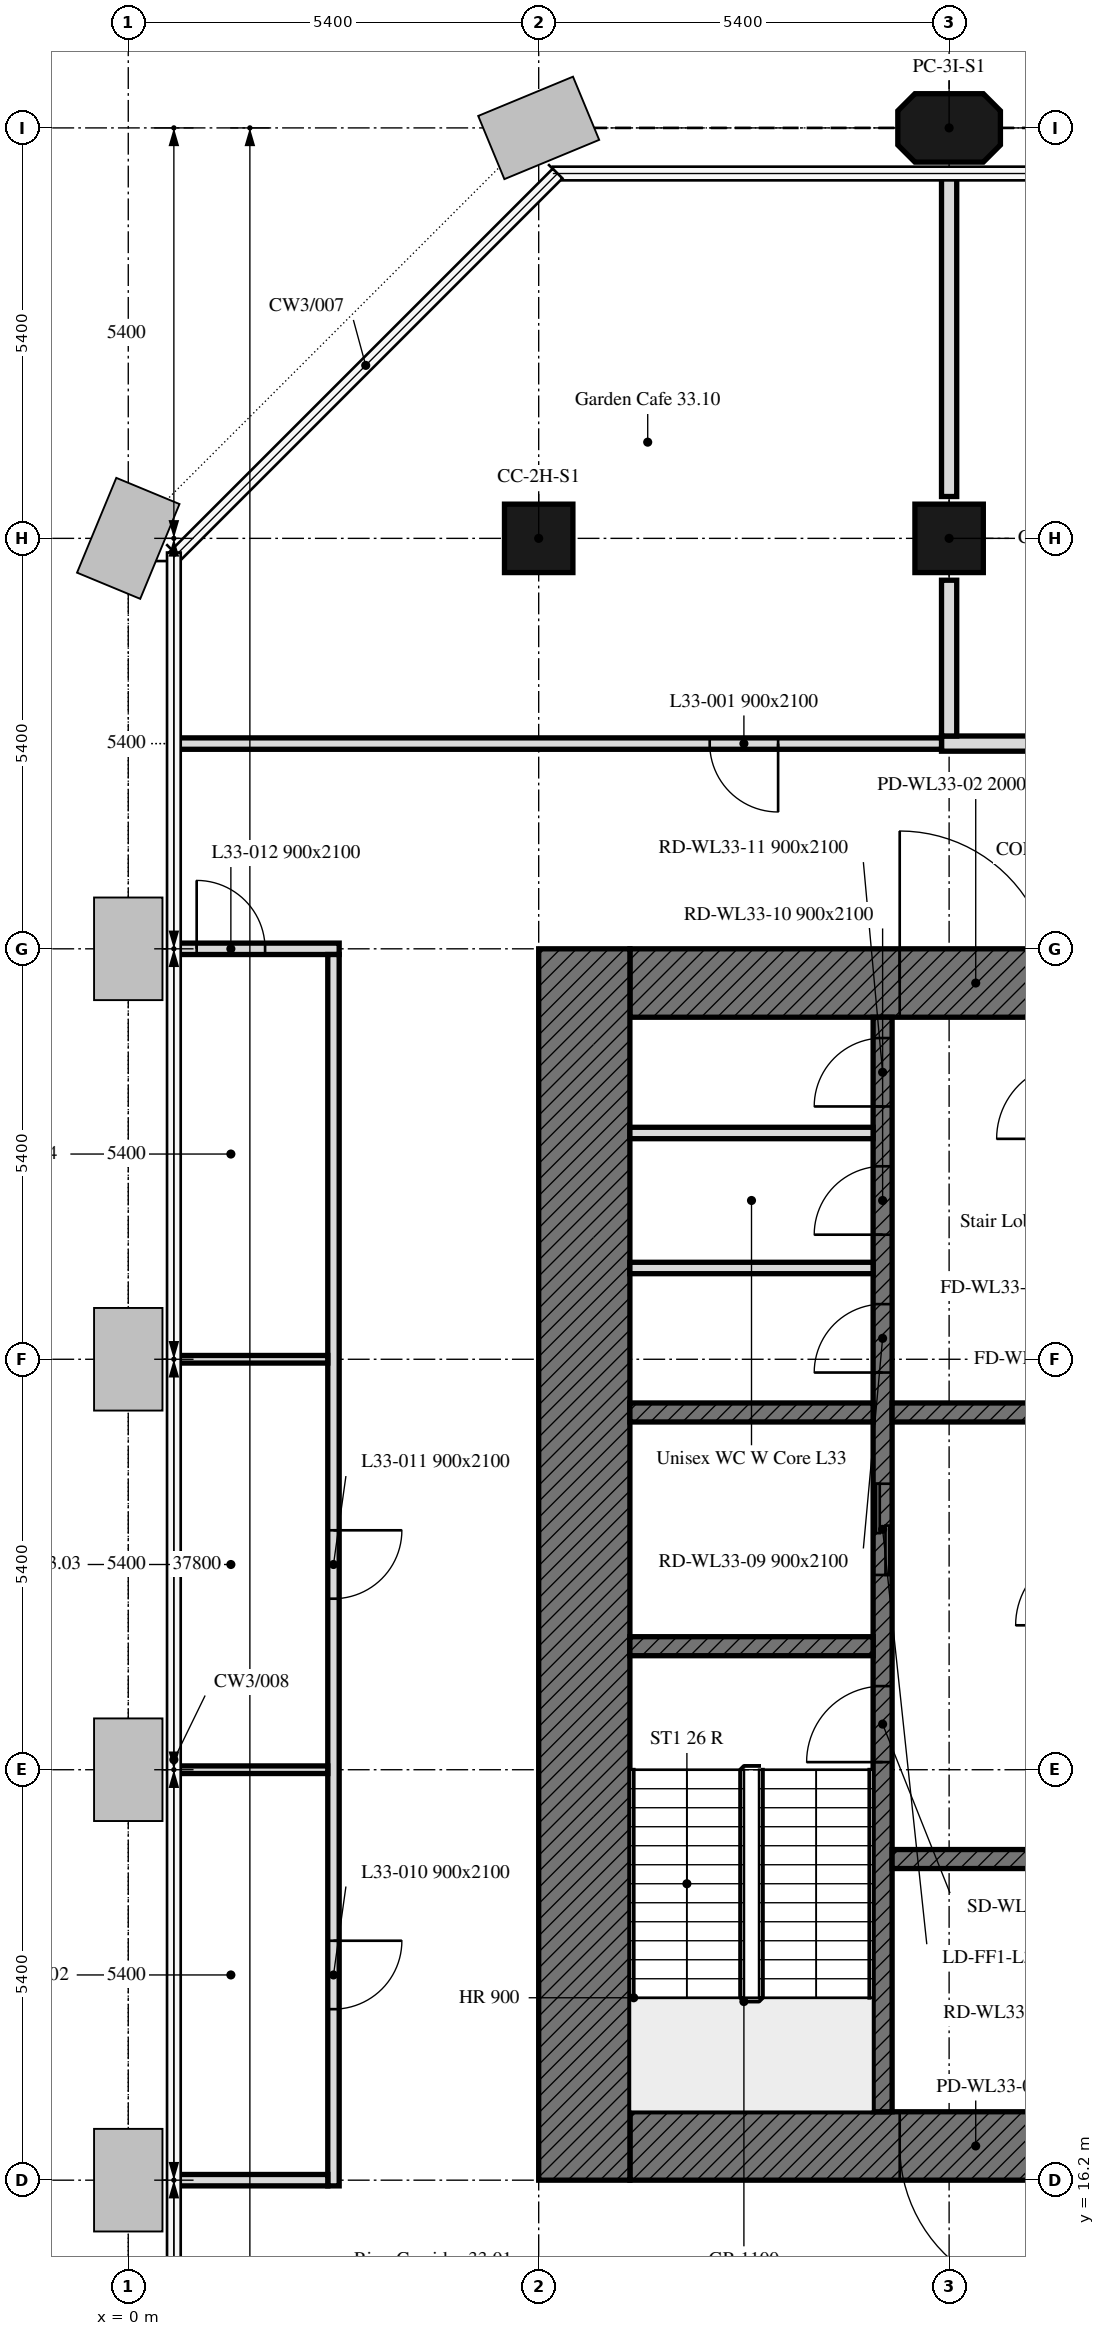
"""IFC4 building model, lengths in metres.
Left out: names, types, materials, properties, quantities, classifications, styles, units other than length and angle.
Written with IfcOpenShell. Run it as: python <this file> out.ifc"""

import sys

from ifc_helpers import new_model, si_unit, direction, frame, frame_2d, origin, origin_2d, place, context, subcontext, project, spatial, polyline, rectangle, outline, extrude, element, fill, save


model = new_model("IFC4")
c1 = context("Model", 3, precision=1e-05, world=origin(), true_north=direction((0.0, 1.0)))
c2 = subcontext(c1, "Body", "Model", "MODEL_VIEW")
j1 = project(units=[si_unit("LENGTHUNIT", "METRE"), si_unit("PLANEANGLEUNIT", "RADIAN")], contexts=[c1])
p1 = place(None, origin())
s1 = spatial("IfcSite", under=j1, at=p1, CompositionType="ELEMENT")
p2 = place(p1, origin())
s2 = spatial("IfcBuilding", under=s1, at=p2, CompositionType="ELEMENT")
p3 = place(p2, frame((0.0, 0.0, 143.2)))
s3 = spatial("IfcBuildingStorey", under=s2, at=p3, CompositionType="ELEMENT", Elevation=143.2)
for number, where, z_axis, x_axis in (
    (1, (5.4, 37.8, 0.0), (0.0, 0.0, 1.0), (1.0, 0.0, 0.0)),
    (2, (10.8, 37.8, 0.0), (0.0, 0.0, 1.0), (1.0, 0.0, 0.0)),
):
    element("IfcColumn", number, at=place(p3, frame(where, z_axis=z_axis, x_axis=x_axis)), inside=s3, PredefinedType="COLUMN", context=c2, shape_type="SweptSolid", body=[
        extrude(rectangle(XDim=0.9, YDim=0.9, at=origin_2d()), origin(), (0.0, 0.0, 1.0), 4.5),
    ])
p4 = place(p3, frame((10.8, 43.2, 0.0), z_axis=(0.0, 0.0, 1.0), x_axis=(1.0, 0.0, 0.0)))
e3 = element("IfcColumn", 3, at=p4, inside=s3, PredefinedType="COLUMN", context=c2, shape_type="SweptSolid", body=[
    extrude(outline(polyline([(-0.45, -0.45), (0.45, -0.45), (0.675, -0.225), (0.675, 0.225), (0.45, 0.45), (-0.45, 0.45), (-0.675, 0.225), (-0.675, -0.225), (-0.45, -0.45)])), origin(), (0.0, 0.0, 1.0), 4.5),
])
p5 = place(p3, frame((17.7, 16.65, 0.0), z_axis=(0.0, 0.0, 1.0), x_axis=(-1.0, 0.0, 0.0)))
e4 = element("IfcWall", 4, at=p5, inside=s3, PredefinedType="SOLIDWALL", context=c2, shape_type="SweptSolid", body=[
    extrude(rectangle(XDim=11.1, YDim=0.9, at=frame_2d((5.55, 0.0))), origin(), (0.0, 0.0, 1.0), 4.5),
])
p6 = place(p5, frame((5.55, 0.0, 0.0)))
e5 = element("IfcOpeningElement", 5, at=p6, cuts=e4, PredefinedType="OPENING", context=c2, shape_type="SweptSolid", body=[
    extrude(rectangle(XDim=2.0, YDim=2.4, at=frame_2d((1.0, 1.2))), frame((0.0, 0.45, 0.0), z_axis=(0.0, -1.0, 0.0), x_axis=(1.0, 0.0, 0.0)), (0.0, 0.0, 1.0), 0.9),
])
p7 = place(p3, frame((6.6, 31.95, 0.0), z_axis=(0.0, 0.0, 1.0), x_axis=(1.0, 0.0, 0.0)))
e6 = element("IfcWall", 6, at=p7, inside=s3, PredefinedType="SOLIDWALL", context=c2, shape_type="SweptSolid", body=[
    extrude(rectangle(XDim=11.1, YDim=0.9, at=frame_2d((5.55, 0.0))), origin(), (0.0, 0.0, 1.0), 4.5),
])
p8 = place(p7, frame((3.55, 0.0, 0.0)))
e7 = element("IfcOpeningElement", 7, at=p8, cuts=e6, PredefinedType="OPENING", context=c2, shape_type="SweptSolid", body=[
    extrude(rectangle(XDim=2.0, YDim=2.4, at=frame_2d((1.0, 1.2))), frame((0.0, 0.45, 0.0), z_axis=(0.0, -1.0, 0.0), x_axis=(1.0, 0.0, 0.0)), (0.0, 0.0, 1.0), 0.9),
])
p9 = place(p3, frame((6.0, 16.2, 0.0), z_axis=(0.0, 0.0, 1.0), x_axis=(0.0, 1.0, 0.0)))
e8 = element("IfcWall", 8, at=p9, inside=s3, PredefinedType="SOLIDWALL", context=c2, shape_type="SweptSolid", body=[
    extrude(rectangle(XDim=16.2, YDim=1.2, at=frame_2d((8.1, 0.0))), origin(), (0.0, 0.0, 1.0), 4.5),
])
p10 = place(p3, frame((9.925, 17.1, 0.0), z_axis=(0.0, 0.0, 1.0), x_axis=(0.0, 1.0, 0.0)))
e9 = element("IfcWall", 9, at=p10, inside=s3, PredefinedType="SOLIDWALL", context=c2, shape_type="SweptSolid", body=[
    extrude(rectangle(XDim=14.4, YDim=0.25, at=frame_2d((7.2, 0.0))), origin(), (0.0, 0.0, 1.0), 4.5),
])
p11 = place(p10, frame((4.6, 0.0, 0.0)))
e10 = element("IfcOpeningElement", 10, at=p11, cuts=e9, PredefinedType="OPENING", context=c2, shape_type="SweptSolid", body=[
    extrude(rectangle(XDim=1.0, YDim=2.1, at=frame_2d((0.5, 1.05))), frame((0.0, 0.125, 0.0), z_axis=(0.0, -1.0, 0.0), x_axis=(1.0, 0.0, 0.0)), (0.0, 0.0, 1.0), 0.25),
])
p12 = place(p10, frame((7.062, 0.0, 0.0)))
e11 = element("IfcOpeningElement", 11, at=p12, cuts=e9, PredefinedType="OPENING", context=c2, shape_type="SweptSolid", body=[
    extrude(rectangle(XDim=1.2, YDim=2.1, at=frame_2d((0.6, 1.05))), frame((0.0, 0.125, 0.0), z_axis=(0.0, -1.0, 0.0), x_axis=(1.0, 0.0, 0.0)), (0.0, 0.0, 1.0), 0.25),
])
p13 = place(p10, frame((9.726, 0.0, 0.0)))
e12 = element("IfcOpeningElement", 12, at=p13, cuts=e9, PredefinedType="OPENING", context=c2, shape_type="SweptSolid", body=[
    extrude(rectangle(XDim=0.9, YDim=2.1, at=frame_2d((0.45, 1.05))), frame((0.0, 0.125, 0.0), z_axis=(0.0, -1.0, 0.0), x_axis=(1.0, 0.0, 0.0)), (0.0, 0.0, 1.0), 0.25),
])
p14 = place(p10, frame((11.539, 0.0, 0.0)))
e13 = element("IfcOpeningElement", 13, at=p14, cuts=e9, PredefinedType="OPENING", context=c2, shape_type="SweptSolid", body=[
    extrude(rectangle(XDim=0.9, YDim=2.1, at=frame_2d((0.45, 1.05))), frame((0.0, 0.125, 0.0), z_axis=(0.0, -1.0, 0.0), x_axis=(1.0, 0.0, 0.0)), (0.0, 0.0, 1.0), 0.25),
])
p15 = place(p10, frame((13.226, 0.0, 0.0)))
e14 = element("IfcOpeningElement", 14, at=p15, cuts=e9, PredefinedType="OPENING", context=c2, shape_type="SweptSolid", body=[
    extrude(rectangle(XDim=0.9, YDim=2.1, at=frame_2d((0.45, 1.05))), frame((0.0, 0.125, 0.0), z_axis=(0.0, -1.0, 0.0), x_axis=(1.0, 0.0, 0.0)), (0.0, 0.0, 1.0), 0.25),
])
for number, where, z_axis, x_axis in (
    (15, (6.6, 23.225, 0.0), (0.0, 0.0, 1.0), (1.0, 0.0, 0.0)),
    (16, (6.6, 26.3, 0.0), (0.0, 0.0, 1.0), (1.0, 0.0, 0.0)),
):
    element("IfcWall", number, at=place(p3, frame(where, z_axis=z_axis, x_axis=x_axis)), inside=s3, PredefinedType="SOLIDWALL", context=c2, shape_type="SweptSolid", body=[
        extrude(rectangle(XDim=3.2, YDim=0.25, at=frame_2d((1.6, 0.0))), origin(), (0.0, 0.0, 1.0), 4.5),
    ])
for number, where, z_axis, x_axis in (
    (17, (10.05, 26.3, 0.0), (0.0, 0.0, 1.0), (1.0, 0.0, 0.0)),
    (18, (10.05, 20.425, 0.0), (0.0, 0.0, 1.0), (1.0, 0.0, 0.0)),
):
    element("IfcWall", number, at=place(p3, frame(where, z_axis=z_axis, x_axis=x_axis)), inside=s3, PredefinedType="SOLIDWALL", context=c2, shape_type="SweptSolid", body=[
        extrude(rectangle(XDim=2.75, YDim=0.25, at=frame_2d((1.375, 0.0))), origin(), (0.0, 0.0, 1.0), 4.5),
    ])
for number, where, z_axis, x_axis in (
    (19, (6.6, 28.201, 0.0), (0.0, 0.0, 1.0), (1.0, 0.0, 0.0)),
    (20, (6.6, 29.977, 0.0), (0.0, 0.0, 1.0), (1.0, 0.0, 0.0)),
):
    element("IfcWall", number, at=place(p3, frame(where, z_axis=z_axis, x_axis=x_axis)), inside=s3, PredefinedType="PARTITIONING", context=c2, shape_type="SweptSolid", body=[
        extrude(rectangle(XDim=3.2, YDim=0.15, at=frame_2d((1.6, 0.0))), origin(), (0.0, 0.0, 1.0), 4.5),
    ])
p16 = place(p3, frame((32.5, 35.1, 0.0), z_axis=(0.0, 0.0, 1.0), x_axis=(-1.0, 0.0, 0.0)))
e21 = element("IfcWall", 21, at=p16, inside=s3, PredefinedType="PARTITIONING", context=c2, shape_type="SweptSolid", body=[
    extrude(rectangle(XDim=21.8, YDim=0.2, at=frame_2d((10.9, 0.0))), origin(), (0.0, 0.0, 1.0), 3.75),
])
p17 = place(p16, frame((13.15, 0.0, 0.0)))
e22 = element("IfcOpeningElement", 22, at=p17, cuts=e21, PredefinedType="OPENING", context=c2, shape_type="SweptSolid", body=[
    extrude(rectangle(XDim=0.9, YDim=2.1, at=frame_2d((0.45, 1.05))), frame((0.0, 0.1, 0.0), z_axis=(0.0, -1.0, 0.0), x_axis=(1.0, 0.0, 0.0)), (0.0, 0.0, 1.0), 0.2),
])
p18 = place(p16, frame((2.35, 0.0, 0.0)))
e23 = element("IfcOpeningElement", 23, at=p18, cuts=e21, PredefinedType="OPENING", context=c2, shape_type="SweptSolid", body=[
    extrude(rectangle(XDim=0.9, YDim=2.1, at=frame_2d((0.45, 1.05))), frame((0.0, 0.1, 0.0), z_axis=(0.0, -1.0, 0.0), x_axis=(1.0, 0.0, 0.0)), (0.0, 0.0, 1.0), 0.2),
])
p19 = place(p3, frame((10.7, 35.1, 0.0), z_axis=(0.0, 0.0, 1.0), x_axis=(-1.0, 0.0, 0.0)))
e24 = element("IfcWall", 24, at=p19, inside=s3, PredefinedType="PARTITIONING", context=c2, shape_type="SweptSolid", body=[
    extrude(rectangle(XDim=10.1, YDim=0.15, at=frame_2d((5.05, 0.0))), origin(), (0.0, 0.0, 1.0), 4.5),
])
p20 = place(p19, frame((2.15, 0.0, 0.0)))
e25 = element("IfcOpeningElement", 25, at=p20, cuts=e24, PredefinedType="OPENING", context=c2, shape_type="SweptSolid", body=[
    extrude(rectangle(XDim=0.9, YDim=2.1, at=frame_2d((0.45, 1.05))), frame((0.0, 0.075, 0.0), z_axis=(0.0, -1.0, 0.0), x_axis=(1.0, 0.0, 0.0)), (0.0, 0.0, 1.0), 0.15),
])
p21 = place(p3, frame((0.6, 32.4, 0.0), z_axis=(0.0, 0.0, 1.0), x_axis=(1.0, 0.0, 0.0)))
e26 = element("IfcWall", 26, at=p21, inside=s3, PredefinedType="PARTITIONING", context=c2, shape_type="SweptSolid", body=[
    extrude(rectangle(XDim=2.175, YDim=0.15, at=frame_2d((1.087, 0.0))), origin(), (0.0, 0.0, 1.0), 3.75),
])
p22 = place(p21, frame((0.3, 0.0, 0.0)))
e27 = element("IfcOpeningElement", 27, at=p22, cuts=e26, PredefinedType="OPENING", context=c2, shape_type="SweptSolid", body=[
    extrude(rectangle(XDim=0.9, YDim=2.1, at=frame_2d((0.45, 1.05))), frame((0.0, 0.075, 0.0), z_axis=(0.0, -1.0, 0.0), x_axis=(1.0, 0.0, 0.0)), (0.0, 0.0, 1.0), 0.15),
])
p23 = place(p3, frame((2.7, 32.325, 0.0), z_axis=(0.0, 0.0, 1.0), x_axis=(0.0, -1.0, 0.0)))
e28 = element("IfcWall", 28, at=p23, inside=s3, PredefinedType="PARTITIONING", context=c2, shape_type="SweptSolid", body=[
    extrude(rectangle(XDim=16.2, YDim=0.15, at=frame_2d((8.1, 0.0))), origin(), (0.0, 0.0, 1.0), 3.75),
])
p24 = place(p23, frame((12.975, 0.0, 0.0)))
e29 = element("IfcOpeningElement", 29, at=p24, cuts=e28, PredefinedType="OPENING", context=c2, shape_type="SweptSolid", body=[
    extrude(rectangle(XDim=0.9, YDim=2.1, at=frame_2d((0.45, 1.05))), frame((0.0, 0.075, 0.0), z_axis=(0.0, -1.0, 0.0), x_axis=(1.0, 0.0, 0.0)), (0.0, 0.0, 1.0), 0.15),
])
p25 = place(p23, frame((7.575, 0.0, 0.0)))
e30 = element("IfcOpeningElement", 30, at=p25, cuts=e28, PredefinedType="OPENING", context=c2, shape_type="SweptSolid", body=[
    extrude(rectangle(XDim=0.9, YDim=2.1, at=frame_2d((0.45, 1.05))), frame((0.0, 0.075, 0.0), z_axis=(0.0, -1.0, 0.0), x_axis=(1.0, 0.0, 0.0)), (0.0, 0.0, 1.0), 0.15),
])
p26 = place(p3, frame((2.625, 16.2, 0.0), z_axis=(0.0, 0.0, 1.0), x_axis=(-1.0, 0.0, 0.0)))
e31 = element("IfcWall", 31, at=p26, inside=s3, PredefinedType="PARTITIONING", context=c2, shape_type="SweptSolid", body=[
    extrude(rectangle(XDim=2.025, YDim=0.15, at=frame_2d((1.012, 0.0))), origin(), (0.0, 0.0, 1.0), 4.5),
])
p27 = place(p3, frame((10.8, 35.2, 0.0), z_axis=(0.0, 0.0, 1.0), x_axis=(0.0, 1.0, 0.0)))
e32 = element("IfcWall", 32, at=p27, inside=s3, PredefinedType="PARTITIONING", context=c2, shape_type="SweptSolid", body=[
    extrude(rectangle(XDim=2.049, YDim=0.2, at=frame_2d((1.025, 0.0))), origin(), (0.0, 0.0, 1.0), 4.5),
])
p28 = place(p3, frame((10.8, 38.351, 0.0), z_axis=(0.0, 0.0, 1.0), x_axis=(0.0, 1.0, 0.0)))
e33 = element("IfcWall", 33, at=p28, inside=s3, PredefinedType="PARTITIONING", context=c2, shape_type="SweptSolid", body=[
    extrude(rectangle(XDim=4.25, YDim=0.2, at=frame_2d((2.125, 0.0))), origin(), (0.0, 0.0, 1.0), 4.5),
])
for number, where, z_axis, x_axis in (
    (34, (2.625, 21.6, 0.0), (0.0, 0.0, 1.0), (-1.0, 0.0, 0.0)),
    (35, (2.625, 27.0, 0.0), (0.0, 0.0, 1.0), (-1.0, 0.0, 0.0)),
):
    element("IfcWall", number, at=place(p3, frame(where, z_axis=z_axis, x_axis=x_axis)), inside=s3, PredefinedType="PARTITIONING", context=c2, shape_type="SweptSolid", body=[
        extrude(rectangle(XDim=2.025, YDim=0.1, at=frame_2d((1.012, 0.0))), origin(), (0.0, 0.0, 1.0), 4.5),
    ])
p29 = place(p6, origin())
e36 = element("IfcDoor", 36, at=p29, inside=s3, OperationType="DOUBLE_DOOR_SINGLE_SWING", PredefinedType="DOOR", context=c2, shape_type="SweptSolid", body=[
    extrude(rectangle(XDim=2.0, YDim=2.4, at=frame_2d((1.0, 1.2))), frame((0.0, 0.025, 0.0), z_axis=(0.0, -1.0, 0.0), x_axis=(1.0, 0.0, 0.0)), (0.0, 0.0, 1.0), 0.05),
])
fill(e5, e36)
p30 = place(p8, origin())
e37 = element("IfcDoor", 37, at=p30, inside=s3, OperationType="DOUBLE_DOOR_SINGLE_SWING", PredefinedType="DOOR", context=c2, shape_type="SweptSolid", body=[
    extrude(rectangle(XDim=2.0, YDim=2.4, at=frame_2d((1.0, 1.2))), frame((0.0, 0.025, 0.0), z_axis=(0.0, -1.0, 0.0), x_axis=(1.0, 0.0, 0.0)), (0.0, 0.0, 1.0), 0.05),
])
fill(e7, e37)
p31 = place(p11, origin())
e38 = element("IfcDoor", 38, at=p31, inside=s3, OperationType="SINGLE_SWING_LEFT", PredefinedType="DOOR", context=c2, shape_type="SweptSolid", body=[
    extrude(rectangle(XDim=1.0, YDim=2.1, at=frame_2d((0.5, 1.05))), frame((0.0, 0.025, 0.0), z_axis=(0.0, -1.0, 0.0), x_axis=(1.0, 0.0, 0.0)), (0.0, 0.0, 1.0), 0.05),
])
fill(e10, e38)
p32 = place(p12, origin())
e39 = element("IfcDoor", 39, at=p32, inside=s3, OperationType="DOUBLE_DOOR_SLIDING", PredefinedType="DOOR", context=c2, shape_type="SweptSolid", body=[
    extrude(rectangle(XDim=1.2, YDim=2.1, at=frame_2d((0.6, 1.05))), frame((0.0, 0.025, 0.0), z_axis=(0.0, -1.0, 0.0), x_axis=(1.0, 0.0, 0.0)), (0.0, 0.0, 1.0), 0.05),
])
fill(e11, e39)
p33 = place(p13, origin())
e40 = element("IfcDoor", 40, at=p33, inside=s3, OperationType="SINGLE_SWING_LEFT", PredefinedType="DOOR", context=c2, shape_type="SweptSolid", body=[
    extrude(rectangle(XDim=0.9, YDim=2.1, at=frame_2d((0.45, 1.05))), frame((0.0, 0.025, 0.0), z_axis=(0.0, -1.0, 0.0), x_axis=(1.0, 0.0, 0.0)), (0.0, 0.0, 1.0), 0.05),
])
fill(e12, e40)
p34 = place(p14, origin())
e41 = element("IfcDoor", 41, at=p34, inside=s3, OperationType="SINGLE_SWING_LEFT", PredefinedType="DOOR", context=c2, shape_type="SweptSolid", body=[
    extrude(rectangle(XDim=0.9, YDim=2.1, at=frame_2d((0.45, 1.05))), frame((0.0, 0.025, 0.0), z_axis=(0.0, -1.0, 0.0), x_axis=(1.0, 0.0, 0.0)), (0.0, 0.0, 1.0), 0.05),
])
fill(e13, e41)
p35 = place(p15, origin())
e42 = element("IfcDoor", 42, at=p35, inside=s3, OperationType="SINGLE_SWING_LEFT", PredefinedType="DOOR", context=c2, shape_type="SweptSolid", body=[
    extrude(rectangle(XDim=0.9, YDim=2.1, at=frame_2d((0.45, 1.05))), frame((0.0, 0.025, 0.0), z_axis=(0.0, -1.0, 0.0), x_axis=(1.0, 0.0, 0.0)), (0.0, 0.0, 1.0), 0.05),
])
fill(e14, e42)
p36 = place(p20, origin())
e43 = element("IfcDoor", 43, at=p36, inside=s3, OperationType="SINGLE_SWING_RIGHT", PredefinedType="DOOR", context=c2, shape_type="SweptSolid", body=[
    extrude(rectangle(XDim=0.9, YDim=2.1, at=frame_2d((0.45, 1.05))), frame((0.0, 0.025, 0.0), z_axis=(0.0, -1.0, 0.0), x_axis=(1.0, 0.0, 0.0)), (0.0, 0.0, 1.0), 0.05),
])
fill(e25, e43)
p37 = place(p24, origin())
e44 = element("IfcDoor", 44, at=p37, inside=s3, OperationType="SINGLE_SWING_RIGHT", PredefinedType="DOOR", context=c2, shape_type="SweptSolid", body=[
    extrude(rectangle(XDim=0.9, YDim=2.1, at=frame_2d((0.45, 1.05))), frame((0.0, 0.025, 0.0), z_axis=(0.0, -1.0, 0.0), x_axis=(1.0, 0.0, 0.0)), (0.0, 0.0, 1.0), 0.05),
])
fill(e29, e44)
p38 = place(p25, origin())
e45 = element("IfcDoor", 45, at=p38, inside=s3, OperationType="SINGLE_SWING_RIGHT", PredefinedType="DOOR", context=c2, shape_type="SweptSolid", body=[
    extrude(rectangle(XDim=0.9, YDim=2.1, at=frame_2d((0.45, 1.05))), frame((0.0, 0.025, 0.0), z_axis=(0.0, -1.0, 0.0), x_axis=(1.0, 0.0, 0.0)), (0.0, 0.0, 1.0), 0.05),
])
fill(e30, e45)
p39 = place(p22, origin())
e46 = element("IfcDoor", 46, at=p39, inside=s3, OperationType="SINGLE_SWING_RIGHT", PredefinedType="DOOR", context=c2, shape_type="SweptSolid", body=[
    extrude(rectangle(XDim=0.9, YDim=2.1, at=frame_2d((0.45, 1.05))), frame((0.0, 0.025, 0.0), z_axis=(0.0, -1.0, 0.0), x_axis=(1.0, 0.0, 0.0)), (0.0, 0.0, 1.0), 0.05),
])
fill(e27, e46)
save(model, sys.argv[1])
